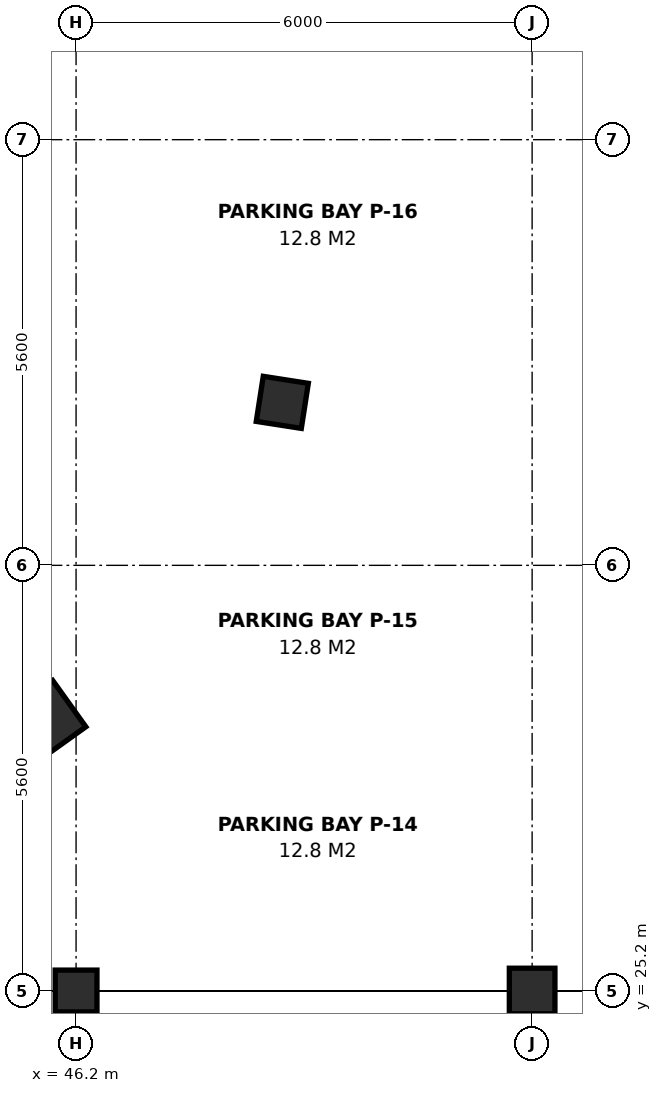
"""IFC4 building model, lengths in metres.
Left out: names, types, materials, properties, quantities, classifications, styles, units other than length and angle.
Written with IfcOpenShell. Run it as: python <this file> out.ifc"""

import sys

from ifc_helpers import new_model, si_unit, direction, frame, origin, origin_2d, place, context, subcontext, project, spatial, rectangle, circle, extrude, element, save


model = new_model("IFC4")
c1 = context("Model", 3, precision=1e-05, world=origin(), true_north=direction((0.0, 1.0)))
c2 = subcontext(c1, "Body", "Model", "MODEL_VIEW")
j1 = project(units=[si_unit("LENGTHUNIT", "METRE"), si_unit("PLANEANGLEUNIT", "RADIAN")], contexts=[c1])
p1 = place(None, origin())
s1 = spatial("IfcSite", under=j1, at=p1, CompositionType="ELEMENT")
p2 = place(p1, origin())
s2 = spatial("IfcBuilding", under=s1, at=p2, CompositionType="ELEMENT")
p3 = place(p2, frame((0.0, 0.0, -4.2)))
s3 = spatial("IfcBuildingStorey", under=s2, at=p3, CompositionType="ELEMENT", Elevation=-4.2)
p4 = place(p3, frame((45.805, 28.762, 0.0), z_axis=(0.0, 0.0, 1.0), x_axis=(0.581981048437, -0.813202348287, 0.0)))
e1 = element("IfcColumn", 1, at=p4, inside=s3, PredefinedType="COLUMN", context=c2, shape_type="SweptSolid", body=[
    extrude(circle(Radius=0.375, at=origin_2d()), origin(), (0.0, 0.0, 1.0), 4.2),
])
p5 = place(p3, frame((46.2, 25.2, 0.0), z_axis=(0.0, 0.0, 1.0), x_axis=(1.0, 0.0, 0.0)))
e2 = element("IfcColumn", 2, at=p5, inside=s3, PredefinedType="COLUMN", context=c2, shape_type="SweptSolid", body=[
    extrude(rectangle(XDim=0.55, YDim=0.55, at=origin_2d()), origin(), (0.0, 0.0, 1.0), 4.2),
])
p6 = place(p3, frame((48.913, 32.944, 0.0), z_axis=(0.0, 0.0, 1.0), x_axis=(0.988148142789, -0.15350325046, 0.0)))
e3 = element("IfcColumn", 3, at=p6, inside=s3, PredefinedType="COLUMN", context=c2, shape_type="SweptSolid", body=[
    extrude(circle(Radius=0.3, at=origin_2d()), origin(), (0.0, 0.0, 1.0), 4.2),
])
p7 = place(p3, frame((52.2, 25.2, 0.0), z_axis=(0.0, 0.0, 1.0), x_axis=(1.0, 0.0, 0.0)))
e4 = element("IfcColumn", 4, at=p7, inside=s3, PredefinedType="COLUMN", context=c2, shape_type="SweptSolid", body=[
    extrude(rectangle(XDim=0.6, YDim=0.6, at=origin_2d()), origin(), (0.0, 0.0, 1.0), 4.2),
])
save(model, sys.argv[1])
